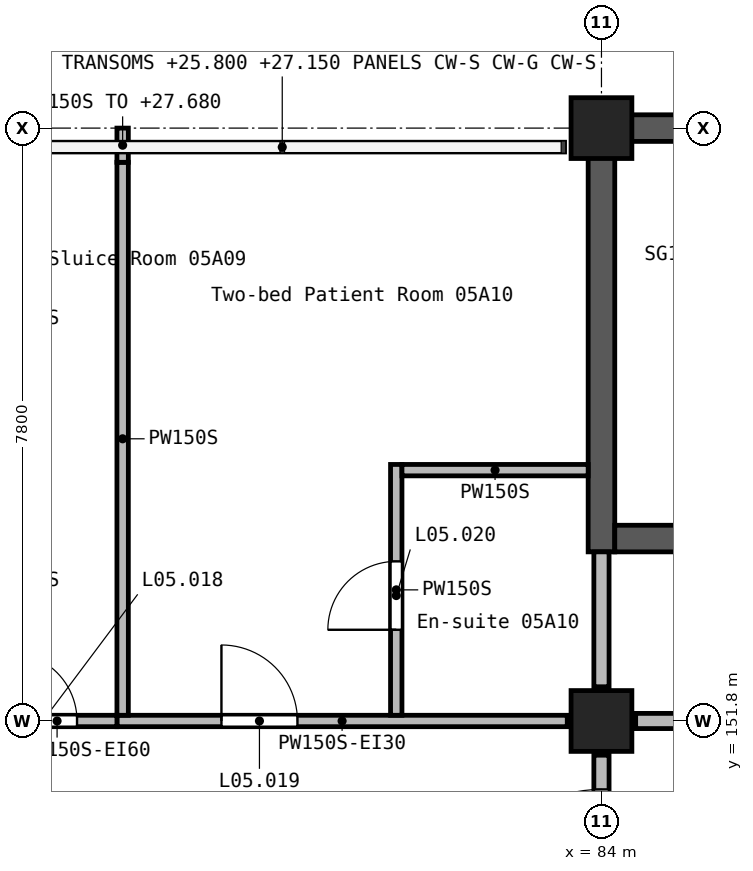
"""IFC4 building model, lengths in metres.
Left out: names, types, materials, properties, quantities, classifications, styles, units other than length and angle.
Written with IfcOpenShell. Run it as: python <this file> out.ifc"""

import sys

from ifc_helpers import new_model, si_unit, direction, frame, frame_2d, origin, origin_2d, place, context, subcontext, project, spatial, rectangle, extrude, element, fill, save


model = new_model("IFC4")
c1 = context("Model", 3, precision=1e-05, world=origin(), true_north=direction((0.0, 1.0)))
c2 = subcontext(c1, "Body", "Model", "MODEL_VIEW")
j1 = project(units=[si_unit("LENGTHUNIT", "METRE"), si_unit("PLANEANGLEUNIT", "RADIAN")], contexts=[c1])
p1 = place(None, origin())
s1 = spatial("IfcSite", under=j1, at=p1, CompositionType="ELEMENT")
p2 = place(p1, origin())
s2 = spatial("IfcBuilding", under=s1, at=p2, CompositionType="ELEMENT")
p3 = place(p2, frame((0.0, 0.0, 24.9)))
s3 = spatial("IfcBuildingStorey", under=s2, at=p3, CompositionType="ELEMENT", Elevation=24.9)
for number, where, z_axis, x_axis in (
    (1, (84.0, 151.8, 0.0), (0.0, 0.0, 1.0), (1.0, 0.0, 0.0)),
    (2, (84.0, 159.6, 0.0), (0.0, 0.0, 1.0), (1.0, 0.0, 0.0)),
):
    element("IfcColumn", number, at=place(p3, frame(where, z_axis=z_axis, x_axis=x_axis)), inside=s3, PredefinedType="COLUMN", context=c2, shape_type="SweptSolid", body=[
        extrude(rectangle(XDim=0.8, YDim=0.8, at=origin_2d()), origin(), (0.0, 0.0, 1.0), 3.9),
    ])
p4 = place(p3, frame((83.825, 159.6, 0.0), z_axis=(0.0, 0.0, 1.0), x_axis=(1.0, 0.0, 0.0)))
e3 = element("IfcWall", 3, at=p4, inside=s3, PredefinedType="SHEAR", context=c2, shape_type="SweptSolid", body=[
    extrude(rectangle(XDim=8.4, YDim=0.35, at=frame_2d((4.2, 0.0))), origin(), (0.0, 0.0, 1.0), 3.9),
])
p5 = place(p3, frame((84.0, 154.025, 0.0), z_axis=(0.0, 0.0, 1.0), x_axis=(0.0, 1.0, 0.0)))
e4 = element("IfcWall", 4, at=p5, inside=s3, PredefinedType="SHEAR", context=c2, shape_type="SweptSolid", body=[
    extrude(rectangle(XDim=5.4, YDim=0.35, at=frame_2d((2.7, 0.0))), origin(), (0.0, 0.0, 1.0), 3.9),
])
p6 = place(p3, frame((84.175, 154.2, 0.0), z_axis=(0.0, 0.0, 1.0), x_axis=(1.0, 0.0, 0.0)))
e5 = element("IfcWall", 5, at=p6, inside=s3, PredefinedType="SHEAR", context=c2, shape_type="SweptSolid", body=[
    extrude(rectangle(XDim=8.05, YDim=0.35, at=frame_2d((4.025, 0.0))), origin(), (0.0, 0.0, 1.0), 3.9),
])
p7 = place(p6, frame((6.525, 0.0, 0.0)))
e6 = element("IfcOpeningElement", 6, at=p7, cuts=e5, PredefinedType="OPENING", context=c2, shape_type="SweptSolid", body=[
    extrude(rectangle(XDim=1.1, YDim=2.1, at=frame_2d((0.55, 1.05))), frame((0.0, 0.185, 0.0), z_axis=(0.0, -1.0, 0.0), x_axis=(1.0, 0.0, 0.0)), (0.0, 0.0, 1.0), 0.37),
])
p8 = place(p3, frame((84.0, 148.65, 0.0), z_axis=(0.0, 0.0, 1.0), x_axis=(0.0, 1.0, 0.0)))
e7 = element("IfcWall", 7, at=p8, inside=s3, PredefinedType="SOLIDWALL", context=c2, shape_type="SweptSolid", body=[
    extrude(rectangle(XDim=2.7, YDim=0.2, at=frame_2d((1.35, 0.0))), origin(), (0.0, 0.0, 1.0), 3.6),
])
p9 = place(p8, frame((0.45, 0.0, 0.0)))
e8 = element("IfcOpeningElement", 8, at=p9, cuts=e7, PredefinedType="OPENING", context=c2, shape_type="SweptSolid", body=[
    extrude(rectangle(XDim=1.8, YDim=2.1, at=frame_2d((0.9, 1.05))), frame((0.0, 0.11, 0.0), z_axis=(0.0, -1.0, 0.0), x_axis=(1.0, 0.0, 0.0)), (0.0, 0.0, 1.0), 0.22),
])
p10 = place(p3, frame((84.0, 152.25, 0.0), z_axis=(0.0, 0.0, 1.0), x_axis=(0.0, 1.0, 0.0)))
e9 = element("IfcWall", 9, at=p10, inside=s3, PredefinedType="SOLIDWALL", context=c2, shape_type="SweptSolid", body=[
    extrude(rectangle(XDim=1.775, YDim=0.2, at=frame_2d((0.887, 0.0))), origin(), (0.0, 0.0, 1.0), 3.6),
])
p11 = place(p3, frame((84.45, 151.8, 0.0), z_axis=(0.0, 0.0, 1.0), x_axis=(1.0, 0.0, 0.0)))
e10 = element("IfcWall", 10, at=p11, inside=s3, PredefinedType="SOLIDWALL", context=c2, shape_type="SweptSolid", body=[
    extrude(rectangle(XDim=7.5, YDim=0.2, at=frame_2d((3.75, 0.0))), origin(), (0.0, 0.0, 1.0), 3.6),
])
p12 = place(p11, frame((3.2, 0.0, 0.0)))
e11 = element("IfcOpeningElement", 11, at=p12, cuts=e10, PredefinedType="OPENING", context=c2, shape_type="SweptSolid", body=[
    extrude(rectangle(XDim=1.1, YDim=2.1, at=frame_2d((0.55, 1.05))), frame((0.0, 0.11, 0.0), z_axis=(0.0, -1.0, 0.0), x_axis=(1.0, 0.0, 0.0)), (0.0, 0.0, 1.0), 0.22),
])
p13 = place(p3, frame((77.625, 151.8, 0.0), z_axis=(0.0, 0.0, 1.0), x_axis=(1.0, 0.0, 0.0)))
e12 = element("IfcWall", 12, at=p13, inside=s3, PredefinedType="PARTITIONING", context=c2, shape_type="SweptSolid", body=[
    extrude(rectangle(XDim=5.925, YDim=0.15, at=frame_2d((2.962, 0.0))), origin(), (0.0, 0.0, 1.0), 3.6),
])
p14 = place(p13, frame((1.375, 0.0, 0.0)))
e13 = element("IfcOpeningElement", 13, at=p14, cuts=e12, PredefinedType="OPENING", context=c2, shape_type="SweptSolid", body=[
    extrude(rectangle(XDim=1.0, YDim=2.1, at=frame_2d((0.5, 1.05))), frame((0.0, 0.085, 0.0), z_axis=(0.0, -1.0, 0.0), x_axis=(1.0, 0.0, 0.0)), (0.0, 0.0, 1.0), 0.17),
])
p15 = place(p3, frame((76.05, 151.8, 0.0), z_axis=(0.0, 0.0, 1.0), x_axis=(1.0, 0.0, 0.0)))
e14 = element("IfcWall", 14, at=p15, inside=s3, PredefinedType="PARTITIONING", context=c2, shape_type="SweptSolid", body=[
    extrude(rectangle(XDim=1.575, YDim=0.15, at=frame_2d((0.788, 0.0))), origin(), (0.0, 0.0, 1.0), 3.6),
])
p16 = place(p15, frame((0.15, 0.0, 0.0)))
e15 = element("IfcOpeningElement", 15, at=p16, cuts=e14, PredefinedType="OPENING", context=c2, shape_type="SweptSolid", body=[
    extrude(rectangle(XDim=0.9, YDim=2.1, at=frame_2d((0.45, 1.05))), frame((0.0, 0.085, 0.0), z_axis=(0.0, -1.0, 0.0), x_axis=(1.0, 0.0, 0.0)), (0.0, 0.0, 1.0), 0.17),
])
p17 = place(p3, frame((77.7, 151.875, 0.0), z_axis=(0.0, 0.0, 1.0), x_axis=(0.0, 1.0, 0.0)))
e16 = element("IfcWall", 16, at=p17, inside=s3, PredefinedType="PARTITIONING", context=c2, shape_type="SweptSolid", body=[
    extrude(rectangle(XDim=7.275, YDim=0.15, at=frame_2d((3.637, 0.0))), origin(), (0.0, 0.0, 1.0), 3.6),
])
p18 = place(p3, frame((77.7, 159.15, 0.0), z_axis=(0.0, 0.0, 1.0), x_axis=(0.0, 1.0, 0.0)))
e17 = element("IfcWall", 17, at=p18, inside=s3, PredefinedType="PARTITIONING", context=c2, shape_type="SweptSolid", body=[
    extrude(rectangle(XDim=0.45, YDim=0.15, at=frame_2d((0.225, 0.0))), origin(), (0.0, 0.0, 1.0), 2.78),
])
p19 = place(p3, frame((81.3, 151.875, 0.0), z_axis=(0.0, 0.0, 1.0), x_axis=(0.0, 1.0, 0.0)))
e18 = element("IfcWall", 18, at=p19, inside=s3, PredefinedType="PARTITIONING", context=c2, shape_type="SweptSolid", body=[
    extrude(rectangle(XDim=3.3, YDim=0.15, at=frame_2d((1.65, 0.0))), origin(), (0.0, 0.0, 1.0), 3.6),
])
p20 = place(p19, frame((1.125, 0.0, 0.0)))
e19 = element("IfcOpeningElement", 19, at=p20, cuts=e18, PredefinedType="OPENING", context=c2, shape_type="SweptSolid", body=[
    extrude(rectangle(XDim=0.9, YDim=2.1, at=frame_2d((0.45, 1.05))), frame((0.0, 0.085, 0.0), z_axis=(0.0, -1.0, 0.0), x_axis=(1.0, 0.0, 0.0)), (0.0, 0.0, 1.0), 0.17),
])
p21 = place(p3, frame((81.375, 155.1, 0.0), z_axis=(0.0, 0.0, 1.0), x_axis=(1.0, 0.0, 0.0)))
e20 = element("IfcWall", 20, at=p21, inside=s3, PredefinedType="PARTITIONING", context=c2, shape_type="SweptSolid", body=[
    extrude(rectangle(XDim=2.45, YDim=0.15, at=frame_2d((1.225, 0.0))), origin(), (0.0, 0.0, 1.0), 3.6),
])
p22 = place(p9, frame((1.8, 0.0, 0.0), z_axis=(0.0, 0.0, 1.0), x_axis=(-1.0, 0.0, 0.0)))
e21 = element("IfcDoor", 21, at=p22, inside=s3, OperationType="DOUBLE_DOOR_SINGLE_SWING", PredefinedType="DOOR", context=c2, shape_type="SweptSolid", body=[
    extrude(rectangle(XDim=1.8, YDim=2.1, at=frame_2d((0.9, 1.05))), frame((0.0, 0.025, 0.0), z_axis=(0.0, -1.0, 0.0), x_axis=(1.0, 0.0, 0.0)), (0.0, 0.0, 1.0), 0.05),
])
fill(e8, e21)
p23 = place(p16, origin())
e22 = element("IfcDoor", 22, at=p23, inside=s3, OperationType="SINGLE_SWING_LEFT", PredefinedType="DOOR", context=c2, shape_type="SweptSolid", body=[
    extrude(rectangle(XDim=0.9, YDim=2.1, at=frame_2d((0.45, 1.05))), frame((0.0, 0.025, 0.0), z_axis=(0.0, -1.0, 0.0), x_axis=(1.0, 0.0, 0.0)), (0.0, 0.0, 1.0), 0.05),
])
fill(e15, e22)
p24 = place(p14, origin())
e23 = element("IfcDoor", 23, at=p24, inside=s3, OperationType="SINGLE_SWING_LEFT", PredefinedType="DOOR", context=c2, shape_type="SweptSolid", body=[
    extrude(rectangle(XDim=1.0, YDim=2.1, at=frame_2d((0.5, 1.05))), frame((0.0, 0.025, 0.0), z_axis=(0.0, -1.0, 0.0), x_axis=(1.0, 0.0, 0.0)), (0.0, 0.0, 1.0), 0.05),
])
fill(e13, e23)
p25 = place(p20, frame((0.9, 0.0, 0.0), z_axis=(0.0, 0.0, 1.0), x_axis=(-1.0, 0.0, 0.0)))
e24 = element("IfcDoor", 24, at=p25, inside=s3, OperationType="SINGLE_SWING_RIGHT", PredefinedType="DOOR", context=c2, shape_type="SweptSolid", body=[
    extrude(rectangle(XDim=0.9, YDim=2.1, at=frame_2d((0.45, 1.05))), frame((0.0, 0.025, 0.0), z_axis=(0.0, -1.0, 0.0), x_axis=(1.0, 0.0, 0.0)), (0.0, 0.0, 1.0), 0.05),
])
fill(e19, e24)
save(model, sys.argv[1])
